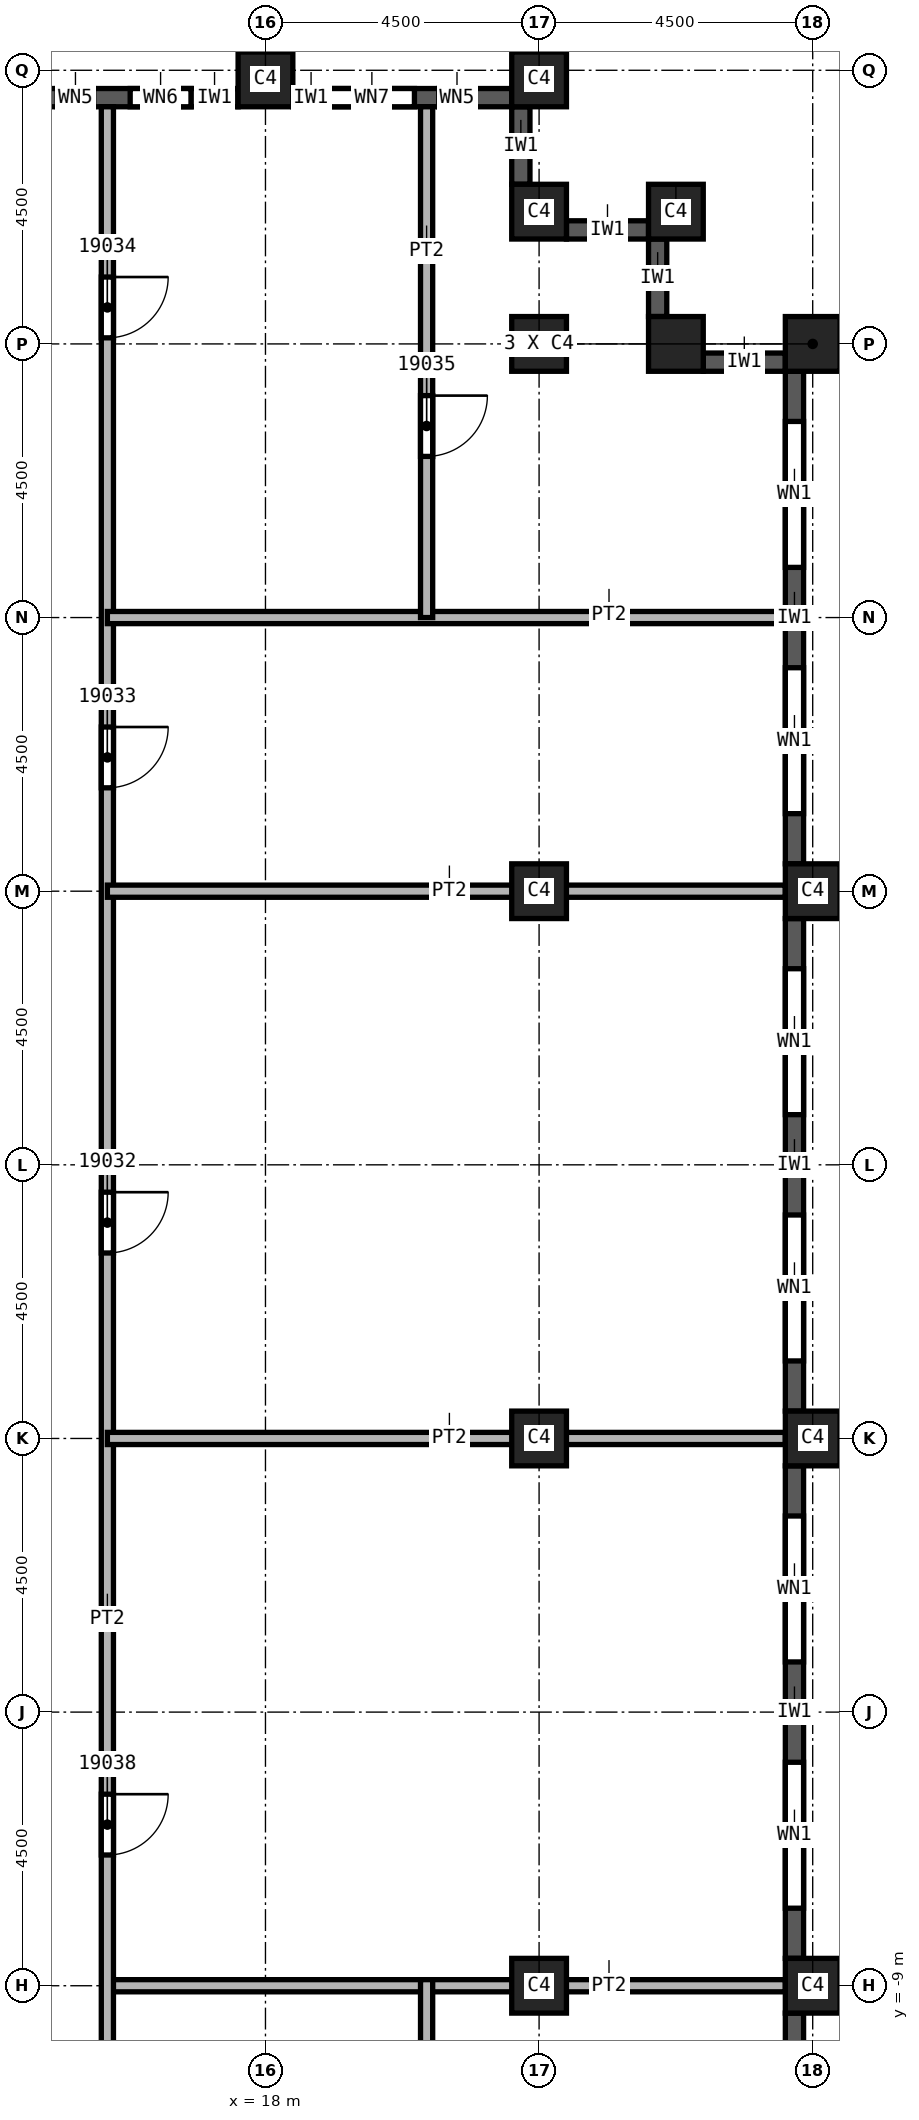
"""IFC4 building model, lengths in metres.
Left out: names, types, materials, properties, quantities, classifications, styles, units other than length and angle.
Written with IfcOpenShell. Run it as: python <this file> out.ifc"""

import sys

from ifc_helpers import new_model, si_unit, direction, frame, frame_2d, origin, origin_2d, place, context, subcontext, project, spatial, rectangle, extrude, element, fill, save


model = new_model("IFC4")
c1 = context("Model", 3, precision=1e-05, world=origin(), true_north=direction((0.0, 1.0)))
c2 = subcontext(c1, "Body", "Model", "MODEL_VIEW")
j1 = project(units=[si_unit("LENGTHUNIT", "METRE"), si_unit("PLANEANGLEUNIT", "RADIAN")], contexts=[c1])
p1 = place(None, origin())
s1 = spatial("IfcSite", under=j1, at=p1, CompositionType="ELEMENT")
p2 = place(p1, origin())
s2 = spatial("IfcBuilding", under=s1, at=p2, CompositionType="ELEMENT")
p3 = place(p2, frame((0.0, 0.0, 278.0)))
s3 = spatial("IfcBuildingStorey", under=s2, at=p3, CompositionType="ELEMENT", Elevation=278.0)
for number, where, z_axis, x_axis in (
    (1, (22.5, 0.0, 0.0), (0.0, 0.0, 1.0), (1.0, 0.0, 0.0)),
    (2, (22.5, 9.0, 0.0), (0.0, 0.0, 1.0), (1.0, 0.0, 0.0)),
    (3, (22.5, 18.0, 0.0), (0.0, 0.0, 1.0), (1.0, 0.0, 0.0)),
    (4, (22.5, -9.0, 0.0), (0.0, 0.0, 1.0), (1.0, 0.0, 0.0)),
    (5, (27.0, 0.0, 0.0), (0.0, 0.0, 1.0), (0.0, 1.0, 0.0)),
    (6, (27.0, 9.0, 0.0), (0.0, 0.0, 1.0), (0.0, 1.0, 0.0)),
    (7, (27.0, 18.0, 0.0), (0.0, 0.0, 1.0), (0.0, 1.0, 0.0)),
    (8, (27.0, -9.0, 0.0), (0.0, 0.0, 1.0), (0.0, 1.0, 0.0)),
    (9, (18.0, 22.35, 0.0), (0.0, 0.0, 1.0), (1.0, 0.0, 0.0)),
    (10, (22.5, 22.35, 0.0), (0.0, 0.0, 1.0), (1.0, 0.0, 0.0)),
    (11, (22.5, 20.175, 0.0), (0.0, 0.0, 1.0), (1.0, 0.0, 0.0)),
    (12, (24.75, 20.175, 0.0), (0.0, 0.0, 1.0), (1.0, 0.0, 0.0)),
    (13, (24.75, 18.0, 0.0), (0.0, 0.0, 1.0), (1.0, 0.0, 0.0)),
):
    element("IfcColumn", number, at=place(p3, frame(where, z_axis=z_axis, x_axis=x_axis)), inside=s3, PredefinedType="COLUMN", context=c2, shape_type="SweptSolid", body=[
        extrude(rectangle(XDim=0.9, YDim=0.9, at=origin_2d()), origin(), (0.0, 0.0, 1.0), 3.72),
    ])
p4 = place(p3, frame((26.7, -17.55, 0.0), z_axis=(0.0, 0.0, 1.0), x_axis=(0.0, 1.0, 0.0)))
e14 = element("IfcWall", 14, at=p4, inside=s3, PredefinedType="SOLIDWALL", context=c2, shape_type="SweptSolid", body=[
    extrude(rectangle(XDim=8.1, YDim=0.3, at=frame_2d((4.05, 0.0))), origin(), (0.0, 0.0, 1.0), 3.12),
])
p5 = place(p4, frame((0.825, 0.0, 0.8)))
e15 = element("IfcOpeningElement", 15, at=p5, cuts=e14, PredefinedType="OPENING", context=c2, shape_type="SweptSolid", body=[
    extrude(rectangle(XDim=2.4, YDim=1.95, at=frame_2d((1.2, 0.975))), frame((0.0, 0.15, 0.0), z_axis=(0.0, -1.0, 0.0), x_axis=(1.0, 0.0, 0.0)), (0.0, 0.0, 1.0), 0.3),
])
p6 = place(p4, frame((4.875, 0.0, 0.8)))
e16 = element("IfcOpeningElement", 16, at=p6, cuts=e14, PredefinedType="OPENING", context=c2, shape_type="SweptSolid", body=[
    extrude(rectangle(XDim=2.4, YDim=1.95, at=frame_2d((1.2, 0.975))), frame((0.0, 0.15, 0.0), z_axis=(0.0, -1.0, 0.0), x_axis=(1.0, 0.0, 0.0)), (0.0, 0.0, 1.0), 0.3),
])
p7 = place(p3, frame((26.7, -8.55, 0.0), z_axis=(0.0, 0.0, 1.0), x_axis=(0.0, 1.0, 0.0)))
e17 = element("IfcWall", 17, at=p7, inside=s3, PredefinedType="SOLIDWALL", context=c2, shape_type="SweptSolid", body=[
    extrude(rectangle(XDim=8.1, YDim=0.3, at=frame_2d((4.05, 0.0))), origin(), (0.0, 0.0, 1.0), 3.12),
])
p8 = place(p7, frame((0.825, 0.0, 0.8)))
e18 = element("IfcOpeningElement", 18, at=p8, cuts=e17, PredefinedType="OPENING", context=c2, shape_type="SweptSolid", body=[
    extrude(rectangle(XDim=2.4, YDim=1.95, at=frame_2d((1.2, 0.975))), frame((0.0, 0.15, 0.0), z_axis=(0.0, -1.0, 0.0), x_axis=(1.0, 0.0, 0.0)), (0.0, 0.0, 1.0), 0.3),
])
p9 = place(p7, frame((4.875, 0.0, 0.8)))
e19 = element("IfcOpeningElement", 19, at=p9, cuts=e17, PredefinedType="OPENING", context=c2, shape_type="SweptSolid", body=[
    extrude(rectangle(XDim=2.4, YDim=1.95, at=frame_2d((1.2, 0.975))), frame((0.0, 0.15, 0.0), z_axis=(0.0, -1.0, 0.0), x_axis=(1.0, 0.0, 0.0)), (0.0, 0.0, 1.0), 0.3),
])
p10 = place(p3, frame((26.7, 0.45, 0.0), z_axis=(0.0, 0.0, 1.0), x_axis=(0.0, 1.0, 0.0)))
e20 = element("IfcWall", 20, at=p10, inside=s3, PredefinedType="SOLIDWALL", context=c2, shape_type="SweptSolid", body=[
    extrude(rectangle(XDim=8.1, YDim=0.3, at=frame_2d((4.05, 0.0))), origin(), (0.0, 0.0, 1.0), 3.12),
])
p11 = place(p10, frame((0.825, 0.0, 0.8)))
e21 = element("IfcOpeningElement", 21, at=p11, cuts=e20, PredefinedType="OPENING", context=c2, shape_type="SweptSolid", body=[
    extrude(rectangle(XDim=2.4, YDim=1.95, at=frame_2d((1.2, 0.975))), frame((0.0, 0.15, 0.0), z_axis=(0.0, -1.0, 0.0), x_axis=(1.0, 0.0, 0.0)), (0.0, 0.0, 1.0), 0.3),
])
p12 = place(p10, frame((4.875, 0.0, 0.8)))
e22 = element("IfcOpeningElement", 22, at=p12, cuts=e20, PredefinedType="OPENING", context=c2, shape_type="SweptSolid", body=[
    extrude(rectangle(XDim=2.4, YDim=1.95, at=frame_2d((1.2, 0.975))), frame((0.0, 0.15, 0.0), z_axis=(0.0, -1.0, 0.0), x_axis=(1.0, 0.0, 0.0)), (0.0, 0.0, 1.0), 0.3),
])
p13 = place(p3, frame((26.7, 9.45, 0.0), z_axis=(0.0, 0.0, 1.0), x_axis=(0.0, 1.0, 0.0)))
e23 = element("IfcWall", 23, at=p13, inside=s3, PredefinedType="SOLIDWALL", context=c2, shape_type="SweptSolid", body=[
    extrude(rectangle(XDim=8.1, YDim=0.3, at=frame_2d((4.05, 0.0))), origin(), (0.0, 0.0, 1.0), 3.12),
])
p14 = place(p13, frame((0.825, 0.0, 0.8)))
e24 = element("IfcOpeningElement", 24, at=p14, cuts=e23, PredefinedType="OPENING", context=c2, shape_type="SweptSolid", body=[
    extrude(rectangle(XDim=2.4, YDim=1.95, at=frame_2d((1.2, 0.975))), frame((0.0, 0.15, 0.0), z_axis=(0.0, -1.0, 0.0), x_axis=(1.0, 0.0, 0.0)), (0.0, 0.0, 1.0), 0.3),
])
p15 = place(p13, frame((4.875, 0.0, 0.8)))
e25 = element("IfcOpeningElement", 25, at=p15, cuts=e23, PredefinedType="OPENING", context=c2, shape_type="SweptSolid", body=[
    extrude(rectangle(XDim=2.4, YDim=1.95, at=frame_2d((1.2, 0.975))), frame((0.0, 0.15, 0.0), z_axis=(0.0, -1.0, 0.0), x_axis=(1.0, 0.0, 0.0)), (0.0, 0.0, 1.0), 0.3),
])
p16 = place(p3, frame((26.55, 17.7, 0.0), z_axis=(0.0, 0.0, 1.0), x_axis=(-1.0, 0.0, 0.0)))
e26 = element("IfcWall", 26, at=p16, inside=s3, PredefinedType="SOLIDWALL", context=c2, shape_type="SweptSolid", body=[
    extrude(rectangle(XDim=1.35, YDim=0.3, at=frame_2d((0.675, 0.0))), origin(), (0.0, 0.0, 1.0), 3.12),
])
p17 = place(p3, frame((24.45, 18.45, 0.0), z_axis=(0.0, 0.0, 1.0), x_axis=(0.0, 1.0, 0.0)))
e27 = element("IfcWall", 27, at=p17, inside=s3, PredefinedType="SOLIDWALL", context=c2, shape_type="SweptSolid", body=[
    extrude(rectangle(XDim=1.275, YDim=0.3, at=frame_2d((0.638, 0.0))), origin(), (0.0, 0.0, 1.0), 3.12),
])
p18 = place(p3, frame((24.3, 19.875, 0.0), z_axis=(0.0, 0.0, 1.0), x_axis=(-1.0, 0.0, 0.0)))
e28 = element("IfcWall", 28, at=p18, inside=s3, PredefinedType="SOLIDWALL", context=c2, shape_type="SweptSolid", body=[
    extrude(rectangle(XDim=1.35, YDim=0.3, at=frame_2d((0.675, 0.0))), origin(), (0.0, 0.0, 1.0), 3.12),
])
p19 = place(p3, frame((22.2, 20.625, 0.0), z_axis=(0.0, 0.0, 1.0), x_axis=(0.0, 1.0, 0.0)))
e29 = element("IfcWall", 29, at=p19, inside=s3, PredefinedType="SOLIDWALL", context=c2, shape_type="SweptSolid", body=[
    extrude(rectangle(XDim=1.275, YDim=0.3, at=frame_2d((0.637, 0.0))), origin(), (0.0, 0.0, 1.0), 3.12),
])
p20 = place(p3, frame((22.05, 22.05, 0.0), z_axis=(0.0, 0.0, 1.0), x_axis=(-1.0, 0.0, 0.0)))
e30 = element("IfcWall", 30, at=p20, inside=s3, PredefinedType="SOLIDWALL", context=c2, shape_type="SweptSolid", body=[
    extrude(rectangle(XDim=3.6, YDim=0.3, at=frame_2d((1.8, 0.0))), origin(), (0.0, 0.0, 1.0), 3.12),
])
p21 = place(p20, frame((0.6, 0.0, 0.8)))
e31 = element("IfcOpeningElement", 31, at=p21, cuts=e30, PredefinedType="OPENING", context=c2, shape_type="SweptSolid", body=[
    extrude(rectangle(XDim=0.6, YDim=1.95, at=frame_2d((0.3, 0.975))), frame((0.0, 0.15, 0.0), z_axis=(0.0, -1.0, 0.0), x_axis=(1.0, 0.0, 0.0)), (0.0, 0.0, 1.0), 0.3),
])
p22 = place(p20, frame((1.6, 0.0, 0.8)))
e32 = element("IfcOpeningElement", 32, at=p22, cuts=e30, PredefinedType="OPENING", context=c2, shape_type="SweptSolid", body=[
    extrude(rectangle(XDim=1.4, YDim=1.95, at=frame_2d((0.7, 0.975))), frame((0.0, 0.15, 0.0), z_axis=(0.0, -1.0, 0.0), x_axis=(1.0, 0.0, 0.0)), (0.0, 0.0, 1.0), 0.3),
])
p23 = place(p3, frame((17.55, 22.05, 0.0), z_axis=(0.0, 0.0, 1.0), x_axis=(-1.0, 0.0, 0.0)))
e33 = element("IfcWall", 33, at=p23, inside=s3, PredefinedType="SOLIDWALL", context=c2, shape_type="SweptSolid", body=[
    extrude(rectangle(XDim=3.6, YDim=0.3, at=frame_2d((1.8, 0.0))), origin(), (0.0, 0.0, 1.0), 3.12),
])
p24 = place(p23, frame((0.775, 0.0, 0.8)))
e34 = element("IfcOpeningElement", 34, at=p24, cuts=e33, PredefinedType="OPENING", context=c2, shape_type="SweptSolid", body=[
    extrude(rectangle(XDim=1.0, YDim=1.95, at=frame_2d((0.5, 0.975))), frame((0.0, 0.15, 0.0), z_axis=(0.0, -1.0, 0.0), x_axis=(1.0, 0.0, 0.0)), (0.0, 0.0, 1.0), 0.3),
])
p25 = place(p23, frame((2.375, 0.0, 0.8)))
e35 = element("IfcOpeningElement", 35, at=p25, cuts=e33, PredefinedType="OPENING", context=c2, shape_type="SweptSolid", body=[
    extrude(rectangle(XDim=0.6, YDim=1.95, at=frame_2d((0.3, 0.975))), frame((0.0, 0.15, 0.0), z_axis=(0.0, -1.0, 0.0), x_axis=(1.0, 0.0, 0.0)), (0.0, 0.0, 1.0), 0.3),
])
p26 = place(p3, frame((15.4, -9.0, 0.0), z_axis=(0.0, 0.0, 1.0), x_axis=(1.0, 0.0, 0.0)))
e36 = element("IfcWall", 36, at=p26, inside=s3, PredefinedType="PARTITIONING", context=c2, shape_type="SweptSolid", body=[
    extrude(rectangle(XDim=11.15, YDim=0.2, at=frame_2d((5.575, 0.0))), origin(), (0.0, 0.0, 1.0), 3.72),
])
p27 = place(p3, frame((15.4, 21.9, 0.0), z_axis=(0.0, 0.0, 1.0), x_axis=(0.0, -1.0, 0.0)))
e37 = element("IfcWall", 37, at=p27, inside=s3, PredefinedType="PARTITIONING", context=c2, shape_type="SweptSolid", body=[
    extrude(rectangle(XDim=43.8, YDim=0.2, at=frame_2d((21.9, 0.0))), origin(), (0.0, 0.0, 1.0), 3.72),
])
p28 = place(p27, frame((17.85, 0.0, 0.0)))
e38 = element("IfcOpeningElement", 38, at=p28, cuts=e37, PredefinedType="OPENING", context=c2, shape_type="SweptSolid", body=[
    extrude(rectangle(XDim=1.0, YDim=2.1, at=frame_2d((0.5, 1.05))), frame((0.0, 0.1, 0.0), z_axis=(0.0, -1.0, 0.0), x_axis=(1.0, 0.0, 0.0)), (0.0, 0.0, 1.0), 0.2),
])
p29 = place(p27, frame((10.2, 0.0, 0.0)))
e39 = element("IfcOpeningElement", 39, at=p29, cuts=e37, PredefinedType="OPENING", context=c2, shape_type="SweptSolid", body=[
    extrude(rectangle(XDim=1.0, YDim=2.1, at=frame_2d((0.5, 1.05))), frame((0.0, 0.1, 0.0), z_axis=(0.0, -1.0, 0.0), x_axis=(1.0, 0.0, 0.0)), (0.0, 0.0, 1.0), 0.2),
])
p30 = place(p27, frame((2.8, 0.0, 0.0)))
e40 = element("IfcOpeningElement", 40, at=p30, cuts=e37, PredefinedType="OPENING", context=c2, shape_type="SweptSolid", body=[
    extrude(rectangle(XDim=1.0, YDim=2.1, at=frame_2d((0.5, 1.05))), frame((0.0, 0.1, 0.0), z_axis=(0.0, -1.0, 0.0), x_axis=(1.0, 0.0, 0.0)), (0.0, 0.0, 1.0), 0.2),
])
p31 = place(p27, frame((34.05, 0.0, 0.0)))
e41 = element("IfcOpeningElement", 41, at=p31, cuts=e37, PredefinedType="OPENING", context=c2, shape_type="SweptSolid", body=[
    extrude(rectangle(XDim=1.0, YDim=2.1, at=frame_2d((0.5, 1.05))), frame((0.0, 0.1, 0.0), z_axis=(0.0, -1.0, 0.0), x_axis=(1.0, 0.0, 0.0)), (0.0, 0.0, 1.0), 0.2),
])
p32 = place(p27, frame((27.75, 0.0, 0.0)))
e42 = element("IfcOpeningElement", 42, at=p32, cuts=e37, PredefinedType="OPENING", context=c2, shape_type="SweptSolid", body=[
    extrude(rectangle(XDim=1.0, YDim=2.1, at=frame_2d((0.5, 1.05))), frame((0.0, 0.1, 0.0), z_axis=(0.0, -1.0, 0.0), x_axis=(1.0, 0.0, 0.0)), (0.0, 0.0, 1.0), 0.2),
])
for number, where, z_axis, x_axis in (
    (43, (15.4, 9.0, 0.0), (0.0, 0.0, 1.0), (1.0, 0.0, 0.0)),
    (44, (15.4, 13.5, 0.0), (0.0, 0.0, 1.0), (1.0, 0.0, 0.0)),
):
    element("IfcWall", number, at=place(p3, frame(where, z_axis=z_axis, x_axis=x_axis)), inside=s3, PredefinedType="PARTITIONING", context=c2, shape_type="SweptSolid", body=[
        extrude(rectangle(XDim=11.15, YDim=0.2, at=frame_2d((5.575, 0.0))), origin(), (0.0, 0.0, 1.0), 3.72),
    ])
p33 = place(p3, frame((20.65, -8.9, 0.0), z_axis=(0.0, 0.0, 1.0), x_axis=(0.0, -1.0, 0.0)))
e45 = element("IfcWall", 45, at=p33, inside=s3, PredefinedType="PARTITIONING", context=c2, shape_type="SweptSolid", body=[
    extrude(rectangle(XDim=13.0, YDim=0.2, at=frame_2d((6.5, 0.0))), origin(), (0.0, 0.0, 1.0), 3.72),
])
p34 = place(p33, frame((7.3, 0.0, 0.0)))
e46 = element("IfcOpeningElement", 46, at=p34, cuts=e45, PredefinedType="OPENING", context=c2, shape_type="SweptSolid", body=[
    extrude(rectangle(XDim=1.0, YDim=2.1, at=frame_2d((0.5, 1.05))), frame((0.0, 0.1, 0.0), z_axis=(0.0, -1.0, 0.0), x_axis=(1.0, 0.0, 0.0)), (0.0, 0.0, 1.0), 0.2),
])
p35 = place(p3, frame((20.65, 21.9, 0.0), z_axis=(0.0, 0.0, 1.0), x_axis=(0.0, -1.0, 0.0)))
e47 = element("IfcWall", 47, at=p35, inside=s3, PredefinedType="PARTITIONING", context=c2, shape_type="SweptSolid", body=[
    extrude(rectangle(XDim=8.4, YDim=0.2, at=frame_2d((4.2, 0.0))), origin(), (0.0, 0.0, 1.0), 3.72),
])
p36 = place(p35, frame((4.75, 0.0, 0.0)))
e48 = element("IfcOpeningElement", 48, at=p36, cuts=e47, PredefinedType="OPENING", context=c2, shape_type="SweptSolid", body=[
    extrude(rectangle(XDim=1.0, YDim=2.1, at=frame_2d((0.5, 1.05))), frame((0.0, 0.1, 0.0), z_axis=(0.0, -1.0, 0.0), x_axis=(1.0, 0.0, 0.0)), (0.0, 0.0, 1.0), 0.2),
])
p37 = place(p3, frame((26.55, 0.0, 0.0), z_axis=(0.0, 0.0, 1.0), x_axis=(-1.0, 0.0, 0.0)))
e49 = element("IfcWall", 49, at=p37, inside=s3, PredefinedType="PARTITIONING", context=c2, shape_type="SweptSolid", body=[
    extrude(rectangle(XDim=11.15, YDim=0.2, at=frame_2d((5.575, 0.0))), origin(), (0.0, 0.0, 1.0), 3.72),
])
p38 = place(p8, origin())
e50 = element("IfcWindow", 50, at=p38, inside=s3, PartitioningType="SINGLE_PANEL", PredefinedType="WINDOW", context=c2, shape_type="SweptSolid", body=[
    extrude(rectangle(XDim=2.4, YDim=1.95, at=frame_2d((1.2, 0.975))), frame((0.0, 0.03, 0.0), z_axis=(0.0, -1.0, 0.0), x_axis=(1.0, 0.0, 0.0)), (0.0, 0.0, 1.0), 0.06),
])
fill(e18, e50)
p39 = place(p9, origin())
e51 = element("IfcWindow", 51, at=p39, inside=s3, PartitioningType="SINGLE_PANEL", PredefinedType="WINDOW", context=c2, shape_type="SweptSolid", body=[
    extrude(rectangle(XDim=2.4, YDim=1.95, at=frame_2d((1.2, 0.975))), frame((0.0, 0.03, 0.0), z_axis=(0.0, -1.0, 0.0), x_axis=(1.0, 0.0, 0.0)), (0.0, 0.0, 1.0), 0.06),
])
fill(e19, e51)
p40 = place(p11, origin())
e52 = element("IfcWindow", 52, at=p40, inside=s3, PartitioningType="SINGLE_PANEL", PredefinedType="WINDOW", context=c2, shape_type="SweptSolid", body=[
    extrude(rectangle(XDim=2.4, YDim=1.95, at=frame_2d((1.2, 0.975))), frame((0.0, 0.03, 0.0), z_axis=(0.0, -1.0, 0.0), x_axis=(1.0, 0.0, 0.0)), (0.0, 0.0, 1.0), 0.06),
])
fill(e21, e52)
p41 = place(p12, origin())
e53 = element("IfcWindow", 53, at=p41, inside=s3, PartitioningType="SINGLE_PANEL", PredefinedType="WINDOW", context=c2, shape_type="SweptSolid", body=[
    extrude(rectangle(XDim=2.4, YDim=1.95, at=frame_2d((1.2, 0.975))), frame((0.0, 0.03, 0.0), z_axis=(0.0, -1.0, 0.0), x_axis=(1.0, 0.0, 0.0)), (0.0, 0.0, 1.0), 0.06),
])
fill(e22, e53)
p42 = place(p14, origin())
e54 = element("IfcWindow", 54, at=p42, inside=s3, PartitioningType="SINGLE_PANEL", PredefinedType="WINDOW", context=c2, shape_type="SweptSolid", body=[
    extrude(rectangle(XDim=2.4, YDim=1.95, at=frame_2d((1.2, 0.975))), frame((0.0, 0.03, 0.0), z_axis=(0.0, -1.0, 0.0), x_axis=(1.0, 0.0, 0.0)), (0.0, 0.0, 1.0), 0.06),
])
fill(e24, e54)
p43 = place(p15, origin())
e55 = element("IfcWindow", 55, at=p43, inside=s3, PartitioningType="SINGLE_PANEL", PredefinedType="WINDOW", context=c2, shape_type="SweptSolid", body=[
    extrude(rectangle(XDim=2.4, YDim=1.95, at=frame_2d((1.2, 0.975))), frame((0.0, 0.03, 0.0), z_axis=(0.0, -1.0, 0.0), x_axis=(1.0, 0.0, 0.0)), (0.0, 0.0, 1.0), 0.06),
])
fill(e25, e55)
p44 = place(p28, origin())
e56 = element("IfcDoor", 56, at=p44, inside=s3, OperationType="SINGLE_SWING_LEFT", PredefinedType="DOOR", context=c2, shape_type="SweptSolid", body=[
    extrude(rectangle(XDim=1.0, YDim=2.1, at=frame_2d((0.5, 1.05))), frame((0.0, 0.025, 0.0), z_axis=(0.0, -1.0, 0.0), x_axis=(1.0, 0.0, 0.0)), (0.0, 0.0, 1.0), 0.05),
])
fill(e38, e56)
p45 = place(p29, origin())
e57 = element("IfcDoor", 57, at=p45, inside=s3, OperationType="SINGLE_SWING_RIGHT", PredefinedType="DOOR", context=c2, shape_type="SweptSolid", body=[
    extrude(rectangle(XDim=1.0, YDim=2.1, at=frame_2d((0.5, 1.05))), frame((0.0, 0.025, 0.0), z_axis=(0.0, -1.0, 0.0), x_axis=(1.0, 0.0, 0.0)), (0.0, 0.0, 1.0), 0.05),
])
fill(e39, e57)
p46 = place(p30, origin())
e58 = element("IfcDoor", 58, at=p46, inside=s3, OperationType="SINGLE_SWING_LEFT", PredefinedType="DOOR", context=c2, shape_type="SweptSolid", body=[
    extrude(rectangle(XDim=1.0, YDim=2.1, at=frame_2d((0.5, 1.05))), frame((0.0, 0.025, 0.0), z_axis=(0.0, -1.0, 0.0), x_axis=(1.0, 0.0, 0.0)), (0.0, 0.0, 1.0), 0.05),
])
fill(e40, e58)
p47 = place(p36, origin())
e59 = element("IfcDoor", 59, at=p47, inside=s3, OperationType="SINGLE_SWING_RIGHT", PredefinedType="DOOR", context=c2, shape_type="SweptSolid", body=[
    extrude(rectangle(XDim=1.0, YDim=2.1, at=frame_2d((0.5, 1.05))), frame((0.0, 0.025, 0.0), z_axis=(0.0, -1.0, 0.0), x_axis=(1.0, 0.0, 0.0)), (0.0, 0.0, 1.0), 0.05),
])
fill(e48, e59)
p48 = place(p32, origin())
e60 = element("IfcDoor", 60, at=p48, inside=s3, OperationType="SINGLE_SWING_LEFT", PredefinedType="DOOR", context=c2, shape_type="SweptSolid", body=[
    extrude(rectangle(XDim=1.0, YDim=2.1, at=frame_2d((0.5, 1.05))), frame((0.0, 0.025, 0.0), z_axis=(0.0, -1.0, 0.0), x_axis=(1.0, 0.0, 0.0)), (0.0, 0.0, 1.0), 0.05),
])
fill(e42, e60)
p49 = place(p21, origin())
e61 = element("IfcWindow", 61, at=p49, inside=s3, PartitioningType="SINGLE_PANEL", PredefinedType="WINDOW", context=c2, shape_type="SweptSolid", body=[
    extrude(rectangle(XDim=0.6, YDim=1.95, at=frame_2d((0.3, 0.975))), frame((0.0, 0.03, 0.0), z_axis=(0.0, -1.0, 0.0), x_axis=(1.0, 0.0, 0.0)), (0.0, 0.0, 1.0), 0.06),
])
fill(e31, e61)
p50 = place(p22, origin())
e62 = element("IfcWindow", 62, at=p50, inside=s3, PartitioningType="SINGLE_PANEL", PredefinedType="WINDOW", context=c2, shape_type="SweptSolid", body=[
    extrude(rectangle(XDim=1.4, YDim=1.95, at=frame_2d((0.7, 0.975))), frame((0.0, 0.03, 0.0), z_axis=(0.0, -1.0, 0.0), x_axis=(1.0, 0.0, 0.0)), (0.0, 0.0, 1.0), 0.06),
])
fill(e32, e62)
p51 = place(p24, origin())
e63 = element("IfcWindow", 63, at=p51, inside=s3, PartitioningType="SINGLE_PANEL", PredefinedType="WINDOW", context=c2, shape_type="SweptSolid", body=[
    extrude(rectangle(XDim=1.0, YDim=1.95, at=frame_2d((0.5, 0.975))), frame((0.0, 0.03, 0.0), z_axis=(0.0, -1.0, 0.0), x_axis=(1.0, 0.0, 0.0)), (0.0, 0.0, 1.0), 0.06),
])
fill(e34, e63)
p52 = place(p25, origin())
e64 = element("IfcWindow", 64, at=p52, inside=s3, PartitioningType="SINGLE_PANEL", PredefinedType="WINDOW", context=c2, shape_type="SweptSolid", body=[
    extrude(rectangle(XDim=0.6, YDim=1.95, at=frame_2d((0.3, 0.975))), frame((0.0, 0.03, 0.0), z_axis=(0.0, -1.0, 0.0), x_axis=(1.0, 0.0, 0.0)), (0.0, 0.0, 1.0), 0.06),
])
fill(e35, e64)
save(model, sys.argv[1])
